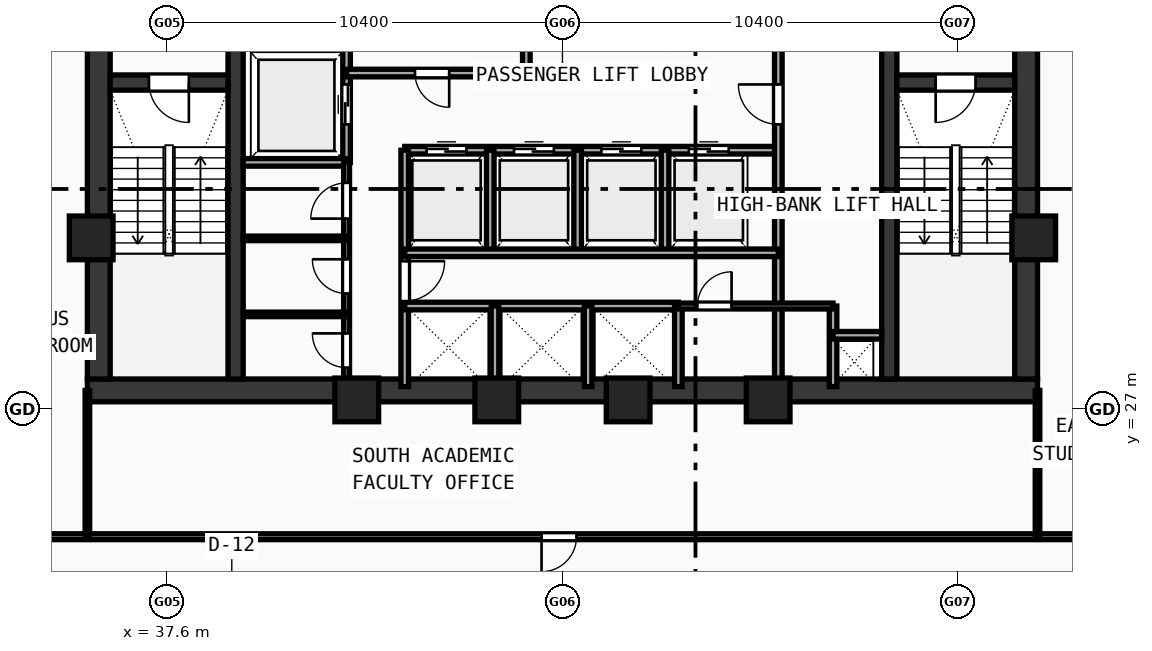
"""IFC4 building model, lengths in metres.
Left out: names, types, materials, properties, quantities, classifications, styles, units other than length and angle.
Written with IfcOpenShell. Run it as: python <this file> out.ifc"""

import sys

from ifc_helpers import new_model, si_unit, direction, frame, frame_2d, origin, origin_with_axes, origin_2d, place, context, subcontext, project, spatial, rectangle, hollow_rectangle, extrude, source, transform, mapped, element, fill, save


model = new_model("IFC4")
c1 = context("Model", 3, precision=1e-05, world=origin(), true_north=direction((0.0, 1.0)))
c2 = subcontext(c1, "Body", "Model", "MODEL_VIEW")
j1 = project(units=[si_unit("LENGTHUNIT", "METRE"), si_unit("PLANEANGLEUNIT", "RADIAN")], contexts=[c1])
p1 = place(None, origin())
s1 = spatial("IfcSite", under=j1, at=p1, CompositionType="ELEMENT")
p2 = place(p1, origin())
s2 = spatial("IfcBuilding", under=s1, at=p2, CompositionType="ELEMENT")
p3 = place(p2, frame((0.0, 0.0, 140.87)))
s3 = spatial("IfcBuildingStorey", under=s2, at=p3, CompositionType="ELEMENT", Elevation=140.87)
p4 = place(p3, frame((35.5, 27.5, 0.0), z_axis=(0.0, 0.0, 1.0), x_axis=(1.0, 0.0, 0.0)))
e1 = element("IfcWall", 1, at=p4, inside=s3, PredefinedType="SHEAR", context=c2, shape_type="SweptSolid", body=[
    extrude(rectangle(XDim=25.0, YDim=0.6, at=frame_2d((12.5, 0.0))), origin(), (0.0, 0.0, 1.0), 3.42),
])
for number, where, z_axis, x_axis in (
    (2, (35.8, 27.8, 0.0), (0.0, 0.0, 1.0), (0.0, 1.0, 0.0)),
    (3, (60.2, 27.8, 0.0), (0.0, 0.0, 1.0), (0.0, 1.0, 0.0)),
):
    element("IfcWall", number, at=place(p3, frame(where, z_axis=z_axis, x_axis=x_axis)), inside=s3, PredefinedType="SHEAR", context=c2, shape_type="SweptSolid", body=[
        extrude(rectangle(XDim=12.1, YDim=0.6, at=frame_2d((6.05, 0.0))), origin(), (0.0, 0.0, 1.0), 3.42),
    ])
p5 = place(p3, frame((39.4, 27.8, 0.0), z_axis=(0.0, 0.0, 1.0), x_axis=(0.0, 1.0, 0.0)))
e4 = element("IfcWall", 4, at=p5, inside=s3, PredefinedType="SHEAR", context=c2, shape_type="SweptSolid", body=[
    extrude(rectangle(XDim=12.1, YDim=0.4, at=frame_2d((6.05, 0.0))), origin(), (0.0, 0.0, 1.0), 3.42),
])
p6 = place(p5, frame((9.95, 0.0, 0.0)))
e5 = element("IfcOpeningElement", 5, at=p6, cuts=e4, PredefinedType="OPENING", context=c2, shape_type="SweptSolid", body=[
    extrude(rectangle(XDim=1.1, YDim=2.1, at=frame_2d((0.55, 1.05))), frame((0.0, 0.21, 0.0), z_axis=(0.0, -1.0, 0.0), x_axis=(1.0, 0.0, 0.0)), (0.0, 0.0, 1.0), 0.42),
])
p7 = place(p3, frame((56.6, 27.8, 0.0), z_axis=(0.0, 0.0, 1.0), x_axis=(0.0, 1.0, 0.0)))
e6 = element("IfcWall", 6, at=p7, inside=s3, PredefinedType="SHEAR", context=c2, shape_type="SweptSolid", body=[
    extrude(rectangle(XDim=12.1, YDim=0.4, at=frame_2d((6.05, 0.0))), origin(), (0.0, 0.0, 1.0), 3.42),
])
p8 = place(p7, frame((9.95, 0.0, 0.0)))
e7 = element("IfcOpeningElement", 7, at=p8, cuts=e6, PredefinedType="OPENING", context=c2, shape_type="SweptSolid", body=[
    extrude(rectangle(XDim=1.1, YDim=2.1, at=frame_2d((0.55, 1.05))), frame((0.0, 0.21, 0.0), z_axis=(0.0, -1.0, 0.0), x_axis=(1.0, 0.0, 0.0)), (0.0, 0.0, 1.0), 0.42),
])
p9 = place(p3, frame((36.1, 35.6, 0.0), z_axis=(0.0, 0.0, 1.0), x_axis=(1.0, 0.0, 0.0)))
e8 = element("IfcWall", 8, at=p9, inside=s3, PredefinedType="SHEAR", context=c2, shape_type="SweptSolid", body=[
    extrude(rectangle(XDim=3.1, YDim=0.4, at=frame_2d((1.55, 0.0))), origin(), (0.0, 0.0, 1.0), 3.42),
])
p10 = place(p9, frame((1.02, 0.0, 0.0)))
e9 = element("IfcOpeningElement", 9, at=p10, cuts=e8, PredefinedType="OPENING", context=c2, shape_type="SweptSolid", body=[
    extrude(rectangle(XDim=1.05, YDim=2.1, at=frame_2d((0.525, 1.05))), frame((0.0, 0.21, 0.0), z_axis=(0.0, -1.0, 0.0), x_axis=(1.0, 0.0, 0.0)), (0.0, 0.0, 1.0), 0.42),
])
p11 = place(p3, frame((56.8, 35.6, 0.0), z_axis=(0.0, 0.0, 1.0), x_axis=(1.0, 0.0, 0.0)))
e10 = element("IfcWall", 10, at=p11, inside=s3, PredefinedType="SHEAR", context=c2, shape_type="SweptSolid", body=[
    extrude(rectangle(XDim=3.1, YDim=0.4, at=frame_2d((1.55, 0.0))), origin(), (0.0, 0.0, 1.0), 3.42),
])
p12 = place(p11, frame((1.02, 0.0, 0.0)))
e11 = element("IfcOpeningElement", 11, at=p12, cuts=e10, PredefinedType="OPENING", context=c2, shape_type="SweptSolid", body=[
    extrude(rectangle(XDim=1.05, YDim=2.1, at=frame_2d((0.525, 1.05))), frame((0.0, 0.21, 0.0), z_axis=(0.0, -1.0, 0.0), x_axis=(1.0, 0.0, 0.0)), (0.0, 0.0, 1.0), 0.42),
])
m1 = source(origin(), c2, "Body", "SweptSolid", [
    extrude(hollow_rectangle(XDim=1.15, YDim=1.15, WallThickness=0.048, at=origin_2d()), origin(), (0.0, 0.0, 1.0), 3.68),
])
for number, where, z_axis, x_axis in (
    (12, (42.588, 27.25, -0.26), (0.0, 0.0, 1.0), (1.0, 0.0, 0.0)),
    (13, (46.272, 27.25, -0.26), (0.0, 0.0, 1.0), (1.0, 0.0, 0.0)),
    (14, (49.729, 27.25, -0.26), (0.0, 0.0, 1.0), (1.0, 0.0, 0.0)),
    (15, (53.412, 27.25, -0.26), (0.0, 0.0, 1.0), (1.0, 0.0, 0.0)),
    (16, (60.4, 31.513, -0.26), (0.0, 0.0, 1.0), (1.0, 0.0, 0.0)),
    (17, (35.6, 31.513, -0.26), (0.0, 0.0, 1.0), (1.0, 0.0, 0.0)),
):
    element("IfcColumn", number, at=place(p3, frame(where, z_axis=z_axis, x_axis=x_axis)), inside=s3, PredefinedType="COLUMN", context=c2, shape_type="MappedRepresentation", body=[
        mapped(m1, transform((0.0, 0.0, 0.0), scale=1.0)),
    ])
p13 = place(p3, frame((42.32, 33.5, 0.0), z_axis=(0.0, 0.0, 1.0), x_axis=(0.0, 1.0, 0.0)))
e18 = element("IfcWall", 18, at=p13, inside=s3, PredefinedType="SOLIDWALL", context=c2, shape_type="SweptSolid", body=[
    extrude(rectangle(XDim=6.45, YDim=0.2, at=frame_2d((3.225, 0.0))), origin(), (0.0, 0.0, 1.0), 3.42),
])
p14 = place(p13, frame((1.0, 0.0, 0.0)))
e19 = element("IfcOpeningElement", 19, at=p14, cuts=e18, PredefinedType="OPENING", context=c2, shape_type="SweptSolid", body=[
    extrude(rectangle(XDim=1.05, YDim=2.1, at=frame_2d((0.525, 1.05))), frame((0.0, 0.11, 0.0), z_axis=(0.0, -1.0, 0.0), x_axis=(1.0, 0.0, 0.0)), (0.0, 0.0, 1.0), 0.22),
])
p15 = place(p3, frame((39.6, 33.5, 0.0), z_axis=(0.0, 0.0, 1.0), x_axis=(1.0, 0.0, 0.0)))
e20 = element("IfcWall", 20, at=p15, inside=s3, PredefinedType="SOLIDWALL", context=c2, shape_type="SweptSolid", body=[
    extrude(rectangle(XDim=2.72, YDim=0.2, at=frame_2d((1.36, 0.0))), origin(), (0.0, 0.0, 1.0), 3.42),
])
p16 = place(p3, frame((42.32, 35.85, 0.0), z_axis=(0.0, 0.0, 1.0), x_axis=(1.0, 0.0, 0.0)))
e21 = element("IfcWall", 21, at=p16, inside=s3, PredefinedType="SOLIDWALL", context=c2, shape_type="SweptSolid", body=[
    extrude(rectangle(XDim=4.73, YDim=0.2, at=frame_2d((2.365, 0.0))), origin(), (0.0, 0.0, 1.0), 3.42),
])
p17 = place(p16, frame((1.8, 0.0, 0.0)))
e22 = element("IfcOpeningElement", 22, at=p17, cuts=e21, PredefinedType="OPENING", context=c2, shape_type="SweptSolid", body=[
    extrude(rectangle(XDim=0.9, YDim=2.1, at=frame_2d((0.45, 1.05))), frame((0.0, 0.11, 0.0), z_axis=(0.0, -1.0, 0.0), x_axis=(1.0, 0.0, 0.0)), (0.0, 0.0, 1.0), 0.22),
])
p18 = place(p3, frame((47.05, 35.85, 0.0), z_axis=(0.0, 0.0, 1.0), x_axis=(0.0, 1.0, 0.0)))
e23 = element("IfcWall", 23, at=p18, inside=s3, PredefinedType="SOLIDWALL", context=c2, shape_type="SweptSolid", body=[
    extrude(rectangle(XDim=4.1, YDim=0.2, at=frame_2d((2.05, 0.0))), origin(), (0.0, 0.0, 1.0), 3.42),
])
p19 = place(p3, frame((43.85, 33.82, 0.0), z_axis=(0.0, 0.0, 1.0), x_axis=(1.0, 0.0, 0.0)))
e24 = element("IfcWall", 24, at=p19, inside=s3, PredefinedType="SOLIDWALL", context=c2, shape_type="SweptSolid", body=[
    extrude(rectangle(XDim=9.83, YDim=0.2, at=frame_2d((4.915, 0.0))), origin(), (0.0, 0.0, 1.0), 3.42),
])
p20 = place(p19, frame((0.575, 0.0, 0.0)))
e25 = element("IfcOpeningElement", 25, at=p20, cuts=e24, PredefinedType="OPENING", context=c2, shape_type="SweptSolid", body=[
    extrude(rectangle(XDim=1.05, YDim=2.1, at=frame_2d((0.525, 1.05))), frame((0.0, 0.11, 0.0), z_axis=(0.0, -1.0, 0.0), x_axis=(1.0, 0.0, 0.0)), (0.0, 0.0, 1.0), 0.22),
])
p21 = place(p19, frame((2.875, 0.0, 0.0)))
e26 = element("IfcOpeningElement", 26, at=p21, cuts=e24, PredefinedType="OPENING", context=c2, shape_type="SweptSolid", body=[
    extrude(rectangle(XDim=1.05, YDim=2.1, at=frame_2d((0.525, 1.05))), frame((0.0, 0.11, 0.0), z_axis=(0.0, -1.0, 0.0), x_axis=(1.0, 0.0, 0.0)), (0.0, 0.0, 1.0), 0.22),
])
p22 = place(p19, frame((5.175, 0.0, 0.0)))
e27 = element("IfcOpeningElement", 27, at=p22, cuts=e24, PredefinedType="OPENING", context=c2, shape_type="SweptSolid", body=[
    extrude(rectangle(XDim=1.05, YDim=2.1, at=frame_2d((0.525, 1.05))), frame((0.0, 0.11, 0.0), z_axis=(0.0, -1.0, 0.0), x_axis=(1.0, 0.0, 0.0)), (0.0, 0.0, 1.0), 0.22),
])
p23 = place(p19, frame((7.475, 0.0, 0.0)))
e28 = element("IfcOpeningElement", 28, at=p23, cuts=e24, PredefinedType="OPENING", context=c2, shape_type="SweptSolid", body=[
    extrude(rectangle(XDim=1.05, YDim=2.1, at=frame_2d((0.525, 1.05))), frame((0.0, 0.11, 0.0), z_axis=(0.0, -1.0, 0.0), x_axis=(1.0, 0.0, 0.0)), (0.0, 0.0, 1.0), 0.22),
])
p24 = place(p3, frame((43.85, 27.6, 0.0), z_axis=(0.0, 0.0, 1.0), x_axis=(0.0, 1.0, 0.0)))
e29 = element("IfcWall", 29, at=p24, inside=s3, PredefinedType="SOLIDWALL", context=c2, shape_type="SweptSolid", body=[
    extrude(rectangle(XDim=6.22, YDim=0.2, at=frame_2d((3.11, 0.0))), origin(), (0.0, 0.0, 1.0), 3.42),
])
p25 = place(p24, frame((2.25, 0.0, 0.0)))
e30 = element("IfcOpeningElement", 30, at=p25, cuts=e29, PredefinedType="OPENING", context=c2, shape_type="SweptSolid", body=[
    extrude(rectangle(XDim=1.05, YDim=2.1, at=frame_2d((0.525, 1.05))), frame((0.0, 0.11, 0.0), z_axis=(0.0, -1.0, 0.0), x_axis=(1.0, 0.0, 0.0)), (0.0, 0.0, 1.0), 0.22),
])
p26 = place(p3, frame((53.68, 27.6, 0.0), z_axis=(0.0, 0.0, 1.0), x_axis=(0.0, 1.0, 0.0)))
e31 = element("IfcWall", 31, at=p26, inside=s3, PredefinedType="SOLIDWALL", context=c2, shape_type="SweptSolid", body=[
    extrude(rectangle(XDim=9.05, YDim=0.2, at=frame_2d((4.525, 0.0))), origin(), (0.0, 0.0, 1.0), 3.42),
])
p27 = place(p26, frame((6.9, 0.0, 0.0)))
e32 = element("IfcOpeningElement", 32, at=p27, cuts=e31, PredefinedType="OPENING", context=c2, shape_type="SweptSolid", body=[
    extrude(rectangle(XDim=1.05, YDim=2.1, at=frame_2d((0.525, 1.05))), frame((0.0, 0.11, 0.0), z_axis=(0.0, -1.0, 0.0), x_axis=(1.0, 0.0, 0.0)), (0.0, 0.0, 1.0), 0.22),
])
for number, where, z_axis, x_axis in (
    (33, (46.1, 31.12, 0.0), (0.0, 0.0, 1.0), (0.0, 1.0, 0.0)),
    (34, (48.4, 31.12, 0.0), (0.0, 0.0, 1.0), (0.0, 1.0, 0.0)),
    (35, (50.7, 31.12, 0.0), (0.0, 0.0, 1.0), (0.0, 1.0, 0.0)),
):
    element("IfcWall", number, at=place(p3, frame(where, z_axis=z_axis, x_axis=x_axis)), inside=s3, PredefinedType="SOLIDWALL", context=c2, shape_type="SweptSolid", body=[
        extrude(rectangle(XDim=2.7, YDim=0.2, at=frame_2d((1.35, 0.0))), origin(), (0.0, 0.0, 1.0), 3.42),
    ])
p28 = place(p3, frame((43.85, 29.72, 0.0), z_axis=(0.0, 0.0, 1.0), x_axis=(1.0, 0.0, 0.0)))
e36 = element("IfcWall", 36, at=p28, inside=s3, PredefinedType="SOLIDWALL", context=c2, shape_type="SweptSolid", body=[
    extrude(rectangle(XDim=7.2, YDim=0.2, at=frame_2d((3.6, 0.0))), origin(), (0.0, 0.0, 1.0), 3.42),
])
p29 = place(p3, frame((51.05, 27.6, 0.0), z_axis=(0.0, 0.0, 1.0), x_axis=(0.0, 1.0, 0.0)))
e37 = element("IfcWall", 37, at=p29, inside=s3, PredefinedType="SOLIDWALL", context=c2, shape_type="SweptSolid", body=[
    extrude(rectangle(XDim=2.12, YDim=0.2, at=frame_2d((1.06, 0.0))), origin(), (0.0, 0.0, 1.0), 3.42),
])
p30 = place(p3, frame((43.85, 31.12, 0.0), z_axis=(0.0, 0.0, 1.0), x_axis=(1.0, 0.0, 0.0)))
e38 = element("IfcWall", 38, at=p30, inside=s3, PredefinedType="SOLIDWALL", context=c2, shape_type="SweptSolid", body=[
    extrude(rectangle(XDim=9.83, YDim=0.2, at=frame_2d((4.915, 0.0))), origin(), (0.0, 0.0, 1.0), 3.42),
])
for number, where, z_axis, x_axis in (
    (39, (46.225, 27.6, 0.0), (0.0, 0.0, 1.0), (0.0, 1.0, 0.0)),
    (40, (48.675, 27.6, 0.0), (0.0, 0.0, 1.0), (0.0, 1.0, 0.0)),
    (41, (55.12, 27.6, 0.0), (0.0, 0.0, 1.0), (0.0, 1.0, 0.0)),
):
    element("IfcWall", number, at=place(p3, frame(where, z_axis=z_axis, x_axis=x_axis)), inside=s3, PredefinedType="SOLIDWALL", context=c2, shape_type="SweptSolid", body=[
        extrude(rectangle(XDim=2.12, YDim=0.2, at=frame_2d((1.06, 0.0))), origin(), (0.0, 0.0, 1.0), 3.42),
    ])
p31 = place(p3, frame((55.12, 28.95, 0.0), z_axis=(0.0, 0.0, 1.0), x_axis=(1.0, 0.0, 0.0)))
e42 = element("IfcWall", 42, at=p31, inside=s3, PredefinedType="SOLIDWALL", context=c2, shape_type="SweptSolid", body=[
    extrude(rectangle(XDim=1.28, YDim=0.2, at=frame_2d((0.64, 0.0))), origin(), (0.0, 0.0, 1.0), 3.42),
])
p32 = place(p3, frame((42.32, 27.6, 0.0), z_axis=(0.0, 0.0, 1.0), x_axis=(0.0, 1.0, 0.0)))
e43 = element("IfcWall", 43, at=p32, inside=s3, PredefinedType="PARTITIONING", context=c2, shape_type="SweptSolid", body=[
    extrude(rectangle(XDim=5.9, YDim=0.155, at=frame_2d((2.95, 0.0))), origin(), (0.0, 0.0, 1.0), 3.42),
])
p33 = place(p32, frame((0.5, 0.0, 0.0)))
e44 = element("IfcOpeningElement", 44, at=p33, cuts=e43, PredefinedType="OPENING", context=c2, shape_type="SweptSolid", body=[
    extrude(rectangle(XDim=0.9, YDim=2.1, at=frame_2d((0.45, 1.05))), frame((0.0, 0.087, 0.0), z_axis=(0.0, -1.0, 0.0), x_axis=(1.0, 0.0, 0.0)), (0.0, 0.0, 1.0), 0.175),
])
p34 = place(p32, frame((2.45, 0.0, 0.0)))
e45 = element("IfcOpeningElement", 45, at=p34, cuts=e43, PredefinedType="OPENING", context=c2, shape_type="SweptSolid", body=[
    extrude(rectangle(XDim=0.9, YDim=2.1, at=frame_2d((0.45, 1.05))), frame((0.0, 0.087, 0.0), z_axis=(0.0, -1.0, 0.0), x_axis=(1.0, 0.0, 0.0)), (0.0, 0.0, 1.0), 0.175),
])
p35 = place(p32, frame((4.42, 0.0, 0.0)))
e46 = element("IfcOpeningElement", 46, at=p35, cuts=e43, PredefinedType="OPENING", context=c2, shape_type="SweptSolid", body=[
    extrude(rectangle(XDim=0.94, YDim=2.1, at=frame_2d((0.47, 1.05))), frame((0.0, 0.087, 0.0), z_axis=(0.0, -1.0, 0.0), x_axis=(1.0, 0.0, 0.0)), (0.0, 0.0, 1.0), 0.175),
])
p36 = place(p3, frame((51.05, 29.72, 0.0), z_axis=(0.0, 0.0, 1.0), x_axis=(1.0, 0.0, 0.0)))
e47 = element("IfcWall", 47, at=p36, inside=s3, PredefinedType="PARTITIONING", context=c2, shape_type="SweptSolid", body=[
    extrude(rectangle(XDim=4.07, YDim=0.155, at=frame_2d((2.035, 0.0))), origin(), (0.0, 0.0, 1.0), 3.42),
])
p37 = place(p36, frame((0.5, 0.0, 0.0)))
e48 = element("IfcOpeningElement", 48, at=p37, cuts=e47, PredefinedType="OPENING", context=c2, shape_type="SweptSolid", body=[
    extrude(rectangle(XDim=0.9, YDim=2.1, at=frame_2d((0.45, 1.05))), frame((0.0, 0.087, 0.0), z_axis=(0.0, -1.0, 0.0), x_axis=(1.0, 0.0, 0.0)), (0.0, 0.0, 1.0), 0.175),
])
for number, where, z_axis, x_axis in (
    (49, (39.6, 29.5, 0.0), (0.0, 0.0, 1.0), (1.0, 0.0, 0.0)),
    (50, (39.6, 31.5, 0.0), (0.0, 0.0, 1.0), (1.0, 0.0, 0.0)),
):
    element("IfcWall", number, at=place(p3, frame(where, z_axis=z_axis, x_axis=x_axis)), inside=s3, PredefinedType="PARTITIONING", context=c2, shape_type="SweptSolid", body=[
        extrude(rectangle(XDim=2.72, YDim=0.12, at=frame_2d((1.36, 0.0))), origin(), (0.0, 0.0, 1.0), 3.42),
    ])
p38 = place(p3, frame((31.45, 23.65, 0.0), z_axis=(0.0, 0.0, 1.0), x_axis=(1.0, 0.0, 0.0)))
e51 = element("IfcWall", 51, at=p38, inside=s3, PredefinedType="PARTITIONING", context=c2, shape_type="SweptSolid", body=[
    extrude(rectangle(XDim=33.1, YDim=0.155, at=frame_2d((16.55, 0.0))), origin(), (0.0, 0.0, 1.0), 2.77),
])
p39 = place(p38, frame((16.0, 0.0, 0.0)))
e52 = element("IfcOpeningElement", 52, at=p39, cuts=e51, PredefinedType="OPENING", context=c2, shape_type="SweptSolid", body=[
    extrude(rectangle(XDim=0.92, YDim=2.1, at=frame_2d((0.46, 1.05))), frame((0.0, 0.087, 0.0), z_axis=(0.0, -1.0, 0.0), x_axis=(1.0, 0.0, 0.0)), (0.0, 0.0, 1.0), 0.175),
])
for number, where, z_axis, x_axis in (
    (53, (35.5, 23.65, 0.0), (0.0, 0.0, 1.0), (0.0, 1.0, 0.0)),
    (54, (60.5, 23.65, 0.0), (0.0, 0.0, 1.0), (0.0, 1.0, 0.0)),
):
    element("IfcWall", number, at=place(p3, frame(where, z_axis=z_axis, x_axis=x_axis)), inside=s3, PredefinedType="PARTITIONING", context=c2, shape_type="SweptSolid", body=[
        extrude(rectangle(XDim=3.85, YDim=0.12, at=frame_2d((1.925, 0.0))), origin(), (0.0, 0.0, 1.0), 3.02),
    ])
m2 = source(origin(), c2, "Body", "SweptSolid", [
    extrude(rectangle(XDim=1.05, YDim=2.1, at=frame_2d((0.525, 1.05))), frame((0.0, 0.025, 0.0), z_axis=(0.0, -1.0, 0.0), x_axis=(1.0, 0.0, 0.0)), (0.0, 0.0, 1.0), 0.05),
])
p40 = place(p10, frame((1.05, 0.0, 0.0), z_axis=(0.0, 0.0, 1.0), x_axis=(-1.0, 0.0, 0.0)))
e55 = element("IfcDoor", 55, at=p40, inside=s3, OperationType="SINGLE_SWING_LEFT", PredefinedType="DOOR", context=c2, shape_type="MappedRepresentation", body=[
    mapped(m2, transform((0.0, 0.0, 0.0), scale=1.0)),
])
fill(e9, e55)
p41 = place(p12, frame((1.05, 0.0, 0.0), z_axis=(0.0, 0.0, 1.0), x_axis=(-1.0, 0.0, 0.0)))
e56 = element("IfcDoor", 56, at=p41, inside=s3, OperationType="SINGLE_SWING_RIGHT", PredefinedType="DOOR", context=c2, shape_type="MappedRepresentation", body=[
    mapped(m2, transform((0.0, 0.0, 0.0), scale=1.0)),
])
fill(e11, e56)
p42 = place(p14, origin_with_axes())
e57 = element("IfcDoor", 57, at=p42, inside=s3, OperationType="DOUBLE_DOOR_SLIDING", PredefinedType="DOOR", context=c2, shape_type="MappedRepresentation", body=[
    mapped(m2, transform((0.0, 0.0, 0.0), scale=1.0)),
])
fill(e19, e57)
m3 = source(origin(), c2, "Body", "SweptSolid", [
    extrude(rectangle(XDim=0.9, YDim=2.1, at=frame_2d((0.45, 1.05))), frame((0.0, 0.025, 0.0), z_axis=(0.0, -1.0, 0.0), x_axis=(1.0, 0.0, 0.0)), (0.0, 0.0, 1.0), 0.05),
])
p43 = place(p17, frame((0.9, 0.0, 0.0), z_axis=(0.0, 0.0, 1.0), x_axis=(-1.0, 0.0, 0.0)))
e58 = element("IfcDoor", 58, at=p43, inside=s3, OperationType="SINGLE_SWING_LEFT", PredefinedType="DOOR", context=c2, shape_type="MappedRepresentation", body=[
    mapped(m3, transform((0.0, 0.0, 0.0), scale=1.0)),
])
fill(e22, e58)
p44 = place(p20, origin_with_axes())
e59 = element("IfcDoor", 59, at=p44, inside=s3, OperationType="DOUBLE_DOOR_SLIDING", PredefinedType="DOOR", context=c2, shape_type="MappedRepresentation", body=[
    mapped(m2, transform((0.0, 0.0, 0.0), scale=1.0)),
])
fill(e25, e59)
p45 = place(p21, origin_with_axes())
e60 = element("IfcDoor", 60, at=p45, inside=s3, OperationType="DOUBLE_DOOR_SLIDING", PredefinedType="DOOR", context=c2, shape_type="MappedRepresentation", body=[
    mapped(m2, transform((0.0, 0.0, 0.0), scale=1.0)),
])
fill(e26, e60)
p46 = place(p22, origin_with_axes())
e61 = element("IfcDoor", 61, at=p46, inside=s3, OperationType="DOUBLE_DOOR_SLIDING", PredefinedType="DOOR", context=c2, shape_type="MappedRepresentation", body=[
    mapped(m2, transform((0.0, 0.0, 0.0), scale=1.0)),
])
fill(e27, e61)
p47 = place(p23, origin_with_axes())
e62 = element("IfcDoor", 62, at=p47, inside=s3, OperationType="DOUBLE_DOOR_SLIDING", PredefinedType="DOOR", context=c2, shape_type="MappedRepresentation", body=[
    mapped(m2, transform((0.0, 0.0, 0.0), scale=1.0)),
])
fill(e28, e62)
p48 = place(p25, frame((1.05, 0.0, 0.0), z_axis=(0.0, 0.0, 1.0), x_axis=(-1.0, 0.0, 0.0)))
e63 = element("IfcDoor", 63, at=p48, inside=s3, OperationType="SINGLE_SWING_LEFT", PredefinedType="DOOR", context=c2, shape_type="MappedRepresentation", body=[
    mapped(m2, transform((0.0, 0.0, 0.0), scale=1.0)),
])
fill(e30, e63)
p49 = place(p27, origin_with_axes())
e64 = element("IfcDoor", 64, at=p49, inside=s3, OperationType="SINGLE_SWING_RIGHT", PredefinedType="DOOR", context=c2, shape_type="MappedRepresentation", body=[
    mapped(m2, transform((0.0, 0.0, 0.0), scale=1.0)),
])
fill(e32, e64)
p50 = place(p33, origin_with_axes())
e65 = element("IfcDoor", 65, at=p50, inside=s3, OperationType="SINGLE_SWING_RIGHT", PredefinedType="DOOR", context=c2, shape_type="MappedRepresentation", body=[
    mapped(m3, transform((0.0, 0.0, 0.0), scale=1.0)),
])
fill(e44, e65)
p51 = place(p34, origin_with_axes())
e66 = element("IfcDoor", 66, at=p51, inside=s3, OperationType="SINGLE_SWING_RIGHT", PredefinedType="DOOR", context=c2, shape_type="MappedRepresentation", body=[
    mapped(m3, transform((0.0, 0.0, 0.0), scale=1.0)),
])
fill(e45, e66)
m4 = source(origin(), c2, "Body", "SweptSolid", [
    extrude(rectangle(XDim=0.94, YDim=2.1, at=frame_2d((0.47, 1.05))), frame((0.0, 0.025, 0.0), z_axis=(0.0, -1.0, 0.0), x_axis=(1.0, 0.0, 0.0)), (0.0, 0.0, 1.0), 0.05),
])
p52 = place(p35, origin_with_axes())
e67 = element("IfcDoor", 67, at=p52, inside=s3, OperationType="SINGLE_SWING_LEFT", PredefinedType="DOOR", context=c2, shape_type="MappedRepresentation", body=[
    mapped(m4, transform((0.0, 0.0, 0.0), scale=1.0)),
])
fill(e46, e67)
p53 = place(p37, origin_with_axes())
e68 = element("IfcDoor", 68, at=p53, inside=s3, OperationType="SINGLE_SWING_RIGHT", PredefinedType="DOOR", context=c2, shape_type="MappedRepresentation", body=[
    mapped(m3, transform((0.0, 0.0, 0.0), scale=1.0)),
])
fill(e48, e68)
m5 = source(origin(), c2, "Body", "SweptSolid", [
    extrude(rectangle(XDim=0.92, YDim=2.1, at=frame_2d((0.46, 1.05))), frame((0.0, 0.025, 0.0), z_axis=(0.0, -1.0, 0.0), x_axis=(1.0, 0.0, 0.0)), (0.0, 0.0, 1.0), 0.05),
])
p54 = place(p39, frame((0.92, 0.0, 0.0), z_axis=(0.0, 0.0, 1.0), x_axis=(-1.0, 0.0, 0.0)))
e69 = element("IfcDoor", 69, at=p54, inside=s3, OperationType="SINGLE_SWING_RIGHT", PredefinedType="DOOR", context=c2, shape_type="MappedRepresentation", body=[
    mapped(m5, transform((0.0, 0.0, 0.0), scale=1.0)),
])
fill(e52, e69)
save(model, sys.argv[1])
